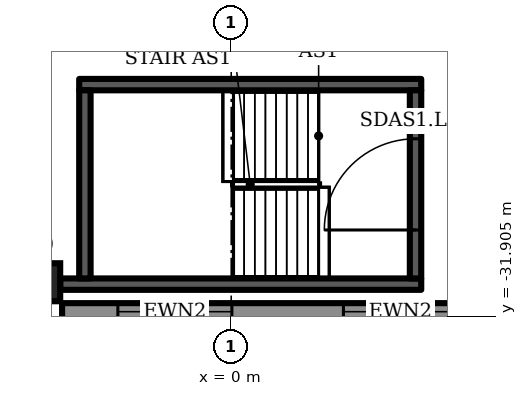
"""IFC4 building model, lengths in metres.
Left out: names, types, materials, properties, quantities, classifications, styles, units other than length and angle.
Written with IfcOpenShell. Run it as: python <this file> out.ifc"""

import sys

from ifc_helpers import new_model, si_unit, direction, frame, frame_2d, origin, origin_2d, place, context, subcontext, project, spatial, rectangle, extrude, element, fill, save


model = new_model("IFC4")
c1 = context("Model", 3, precision=1e-05, world=origin(), true_north=direction((0.0, 1.0)))
c2 = subcontext(c1, "Body", "Model", "MODEL_VIEW")
j1 = project(units=[si_unit("LENGTHUNIT", "METRE"), si_unit("PLANEANGLEUNIT", "RADIAN")], contexts=[c1])
p1 = place(None, origin())
s1 = spatial("IfcSite", under=j1, at=p1, CompositionType="ELEMENT")
p2 = place(p1, origin())
s2 = spatial("IfcBuilding", under=s1, at=p2, CompositionType="ELEMENT")
p3 = place(p2, frame((0.0, 0.0, 15.0)))
s3 = spatial("IfcBuildingStorey", under=s2, at=p3, CompositionType="ELEMENT", Elevation=15.0)
p4 = place(p3, frame((-5.0, -31.0, 0.0), z_axis=(0.0, 0.0, 1.0), x_axis=(1.0, 0.0, 0.0)))
e1 = element("IfcColumn", 1, at=p4, inside=s3, PredefinedType="COLUMN", context=c2, shape_type="SweptSolid", body=[
    extrude(rectangle(XDim=1.0, YDim=1.0, at=origin_2d()), origin(), (0.0, 0.0, 1.0), 6.5),
])
p5 = place(p3, frame((-4.45, -31.775, 0.0), z_axis=(0.0, 0.0, 1.0), x_axis=(1.0, 0.0, 0.0)))
e2 = element("IfcWall", 2, at=p5, inside=s3, PredefinedType="SOLIDWALL", context=c2, shape_type="SweptSolid", body=[
    extrude(rectangle(XDim=100.9, YDim=0.45, at=frame_2d((50.45, 0.0))), origin(), (0.0, 0.0, 1.0), 6.2),
])
p6 = place(p5, frame((1.468, 0.0, 1.0)))
e3 = element("IfcOpeningElement", 3, at=p6, cuts=e2, PredefinedType="OPENING", context=c2, shape_type="SweptSolid", body=[
    extrude(rectangle(XDim=3.0, YDim=4.2, at=frame_2d((1.5, 2.1))), frame((0.0, 0.235, 0.0), z_axis=(0.0, -1.0, 0.0), x_axis=(1.0, 0.0, 0.0)), (0.0, 0.0, 1.0), 0.47),
])
p7 = place(p5, frame((7.403, 0.0, 1.0)))
e4 = element("IfcOpeningElement", 4, at=p7, cuts=e2, PredefinedType="OPENING", context=c2, shape_type="SweptSolid", body=[
    extrude(rectangle(XDim=3.0, YDim=4.2, at=frame_2d((1.5, 2.1))), frame((0.0, 0.235, 0.0), z_axis=(0.0, -1.0, 0.0), x_axis=(1.0, 0.0, 0.0)), (0.0, 0.0, 1.0), 0.47),
])
p8 = place(p5, frame((13.338, 0.0, 1.0)))
e5 = element("IfcOpeningElement", 5, at=p8, cuts=e2, PredefinedType="OPENING", context=c2, shape_type="SweptSolid", body=[
    extrude(rectangle(XDim=3.0, YDim=4.2, at=frame_2d((1.5, 2.1))), frame((0.0, 0.235, 0.0), z_axis=(0.0, -1.0, 0.0), x_axis=(1.0, 0.0, 0.0)), (0.0, 0.0, 1.0), 0.47),
])
p9 = place(p5, frame((19.273, 0.0, 1.0)))
e6 = element("IfcOpeningElement", 6, at=p9, cuts=e2, PredefinedType="OPENING", context=c2, shape_type="SweptSolid", body=[
    extrude(rectangle(XDim=3.0, YDim=4.2, at=frame_2d((1.5, 2.1))), frame((0.0, 0.235, 0.0), z_axis=(0.0, -1.0, 0.0), x_axis=(1.0, 0.0, 0.0)), (0.0, 0.0, 1.0), 0.47),
])
p10 = place(p5, frame((25.209, 0.0, 1.0)))
e7 = element("IfcOpeningElement", 7, at=p10, cuts=e2, PredefinedType="OPENING", context=c2, shape_type="SweptSolid", body=[
    extrude(rectangle(XDim=3.0, YDim=4.2, at=frame_2d((1.5, 2.1))), frame((0.0, 0.235, 0.0), z_axis=(0.0, -1.0, 0.0), x_axis=(1.0, 0.0, 0.0)), (0.0, 0.0, 1.0), 0.47),
])
p11 = place(p5, frame((31.144, 0.0, 1.0)))
e8 = element("IfcOpeningElement", 8, at=p11, cuts=e2, PredefinedType="OPENING", context=c2, shape_type="SweptSolid", body=[
    extrude(rectangle(XDim=3.0, YDim=4.2, at=frame_2d((1.5, 2.1))), frame((0.0, 0.235, 0.0), z_axis=(0.0, -1.0, 0.0), x_axis=(1.0, 0.0, 0.0)), (0.0, 0.0, 1.0), 0.47),
])
p12 = place(p5, frame((37.079, 0.0, 1.0)))
e9 = element("IfcOpeningElement", 9, at=p12, cuts=e2, PredefinedType="OPENING", context=c2, shape_type="SweptSolid", body=[
    extrude(rectangle(XDim=3.0, YDim=4.2, at=frame_2d((1.5, 2.1))), frame((0.0, 0.235, 0.0), z_axis=(0.0, -1.0, 0.0), x_axis=(1.0, 0.0, 0.0)), (0.0, 0.0, 1.0), 0.47),
])
p13 = place(p5, frame((43.015, 0.0, 1.0)))
e10 = element("IfcOpeningElement", 10, at=p13, cuts=e2, PredefinedType="OPENING", context=c2, shape_type="SweptSolid", body=[
    extrude(rectangle(XDim=3.0, YDim=4.2, at=frame_2d((1.5, 2.1))), frame((0.0, 0.235, 0.0), z_axis=(0.0, -1.0, 0.0), x_axis=(1.0, 0.0, 0.0)), (0.0, 0.0, 1.0), 0.47),
])
p14 = place(p5, frame((48.95, 0.0, 1.0)))
e11 = element("IfcOpeningElement", 11, at=p14, cuts=e2, PredefinedType="OPENING", context=c2, shape_type="SweptSolid", body=[
    extrude(rectangle(XDim=3.0, YDim=4.2, at=frame_2d((1.5, 2.1))), frame((0.0, 0.235, 0.0), z_axis=(0.0, -1.0, 0.0), x_axis=(1.0, 0.0, 0.0)), (0.0, 0.0, 1.0), 0.47),
])
p15 = place(p5, frame((54.885, 0.0, 1.0)))
e12 = element("IfcOpeningElement", 12, at=p15, cuts=e2, PredefinedType="OPENING", context=c2, shape_type="SweptSolid", body=[
    extrude(rectangle(XDim=3.0, YDim=4.2, at=frame_2d((1.5, 2.1))), frame((0.0, 0.235, 0.0), z_axis=(0.0, -1.0, 0.0), x_axis=(1.0, 0.0, 0.0)), (0.0, 0.0, 1.0), 0.47),
])
p16 = place(p5, frame((60.821, 0.0, 1.0)))
e13 = element("IfcOpeningElement", 13, at=p16, cuts=e2, PredefinedType="OPENING", context=c2, shape_type="SweptSolid", body=[
    extrude(rectangle(XDim=3.0, YDim=4.2, at=frame_2d((1.5, 2.1))), frame((0.0, 0.235, 0.0), z_axis=(0.0, -1.0, 0.0), x_axis=(1.0, 0.0, 0.0)), (0.0, 0.0, 1.0), 0.47),
])
p17 = place(p5, frame((66.756, 0.0, 1.0)))
e14 = element("IfcOpeningElement", 14, at=p17, cuts=e2, PredefinedType="OPENING", context=c2, shape_type="SweptSolid", body=[
    extrude(rectangle(XDim=3.0, YDim=4.2, at=frame_2d((1.5, 2.1))), frame((0.0, 0.235, 0.0), z_axis=(0.0, -1.0, 0.0), x_axis=(1.0, 0.0, 0.0)), (0.0, 0.0, 1.0), 0.47),
])
p18 = place(p5, frame((72.691, 0.0, 1.0)))
e15 = element("IfcOpeningElement", 15, at=p18, cuts=e2, PredefinedType="OPENING", context=c2, shape_type="SweptSolid", body=[
    extrude(rectangle(XDim=3.0, YDim=4.2, at=frame_2d((1.5, 2.1))), frame((0.0, 0.235, 0.0), z_axis=(0.0, -1.0, 0.0), x_axis=(1.0, 0.0, 0.0)), (0.0, 0.0, 1.0), 0.47),
])
p19 = place(p5, frame((78.626, 0.0, 1.0)))
e16 = element("IfcOpeningElement", 16, at=p19, cuts=e2, PredefinedType="OPENING", context=c2, shape_type="SweptSolid", body=[
    extrude(rectangle(XDim=3.0, YDim=4.2, at=frame_2d((1.5, 2.1))), frame((0.0, 0.235, 0.0), z_axis=(0.0, -1.0, 0.0), x_axis=(1.0, 0.0, 0.0)), (0.0, 0.0, 1.0), 0.47),
])
p20 = place(p5, frame((84.562, 0.0, 1.0)))
e17 = element("IfcOpeningElement", 17, at=p20, cuts=e2, PredefinedType="OPENING", context=c2, shape_type="SweptSolid", body=[
    extrude(rectangle(XDim=3.0, YDim=4.2, at=frame_2d((1.5, 2.1))), frame((0.0, 0.235, 0.0), z_axis=(0.0, -1.0, 0.0), x_axis=(1.0, 0.0, 0.0)), (0.0, 0.0, 1.0), 0.47),
])
p21 = place(p5, frame((90.497, 0.0, 1.0)))
e18 = element("IfcOpeningElement", 18, at=p21, cuts=e2, PredefinedType="OPENING", context=c2, shape_type="SweptSolid", body=[
    extrude(rectangle(XDim=3.0, YDim=4.2, at=frame_2d((1.5, 2.1))), frame((0.0, 0.235, 0.0), z_axis=(0.0, -1.0, 0.0), x_axis=(1.0, 0.0, 0.0)), (0.0, 0.0, 1.0), 0.47),
])
p22 = place(p5, frame((96.432, 0.0, 1.0)))
e19 = element("IfcOpeningElement", 19, at=p22, cuts=e2, PredefinedType="OPENING", context=c2, shape_type="SweptSolid", body=[
    extrude(rectangle(XDim=3.0, YDim=4.2, at=frame_2d((1.5, 2.1))), frame((0.0, 0.235, 0.0), z_axis=(0.0, -1.0, 0.0), x_axis=(1.0, 0.0, 0.0)), (0.0, 0.0, 1.0), 0.47),
])
p23 = place(p3, frame((-4.5, -31.05, 0.0), z_axis=(0.0, 0.0, 1.0), x_axis=(1.0, 0.0, 0.0)))
e20 = element("IfcWall", 20, at=p23, inside=s3, PredefinedType="SHEAR", context=c2, shape_type="SweptSolid", body=[
    extrude(rectangle(XDim=9.5, YDim=0.3, at=frame_2d((4.75, 0.0))), origin(), (0.0, 0.0, 1.0), 6.2),
])
p24 = place(p3, frame((-4.0, -25.8, 0.0), z_axis=(0.0, 0.0, 1.0), x_axis=(1.0, 0.0, 0.0)))
e21 = element("IfcWall", 21, at=p24, inside=s3, PredefinedType="SHEAR", context=c2, shape_type="SweptSolid", body=[
    extrude(rectangle(XDim=9.0, YDim=0.3, at=frame_2d((4.5, 0.0))), origin(), (0.0, 0.0, 1.0), 6.2),
])
p25 = place(p3, frame((-3.85, -30.9, 0.0), z_axis=(0.0, 0.0, 1.0), x_axis=(0.0, 1.0, 0.0)))
e22 = element("IfcWall", 22, at=p25, inside=s3, PredefinedType="SHEAR", context=c2, shape_type="SweptSolid", body=[
    extrude(rectangle(XDim=4.95, YDim=0.3, at=frame_2d((2.475, 0.0))), origin(), (0.0, 0.0, 1.0), 6.2),
])
p26 = place(p3, frame((4.85, -30.9, 0.0), z_axis=(0.0, 0.0, 1.0), x_axis=(0.0, 1.0, 0.0)))
e23 = element("IfcWall", 23, at=p26, inside=s3, PredefinedType="SHEAR", context=c2, shape_type="SweptSolid", body=[
    extrude(rectangle(XDim=4.95, YDim=0.3, at=frame_2d((2.475, 0.0))), origin(), (0.0, 0.0, 1.0), 6.2),
])
p27 = place(p26, frame((1.275, 0.0, 0.0)))
e24 = element("IfcOpeningElement", 24, at=p27, cuts=e23, PredefinedType="OPENING", context=c2, shape_type="SweptSolid", body=[
    extrude(rectangle(XDim=2.4, YDim=2.1, at=frame_2d((1.2, 1.05))), frame((0.0, 0.16, 0.0), z_axis=(0.0, -1.0, 0.0), x_axis=(1.0, 0.0, 0.0)), (0.0, 0.0, 1.0), 0.32),
])
p28 = place(p6, origin())
e25 = element("IfcWindow", 25, at=p28, inside=s3, PartitioningType="SINGLE_PANEL", PredefinedType="WINDOW", context=c2, shape_type="SweptSolid", body=[
    extrude(rectangle(XDim=3.0, YDim=4.2, at=frame_2d((1.5, 2.1))), frame((0.0, 0.105, 0.0), z_axis=(0.0, -1.0, 0.0), x_axis=(1.0, 0.0, 0.0)), (0.0, 0.0, 1.0), 0.06),
])
fill(e3, e25)
p29 = place(p7, origin())
e26 = element("IfcWindow", 26, at=p29, inside=s3, PartitioningType="SINGLE_PANEL", PredefinedType="WINDOW", context=c2, shape_type="SweptSolid", body=[
    extrude(rectangle(XDim=3.0, YDim=4.2, at=frame_2d((1.5, 2.1))), frame((0.0, 0.105, 0.0), z_axis=(0.0, -1.0, 0.0), x_axis=(1.0, 0.0, 0.0)), (0.0, 0.0, 1.0), 0.06),
])
fill(e4, e26)
p30 = place(p27, origin())
e27 = element("IfcDoor", 27, at=p30, inside=s3, OperationType="DOUBLE_DOOR_SINGLE_SWING", PredefinedType="DOOR", context=c2, shape_type="SweptSolid", body=[
    extrude(rectangle(XDim=2.4, YDim=2.1, at=frame_2d((1.2, 1.05))), frame((0.0, 0.025, 0.0), z_axis=(0.0, -1.0, 0.0), x_axis=(1.0, 0.0, 0.0)), (0.0, 0.0, 1.0), 0.05),
])
fill(e24, e27)
save(model, sys.argv[1])
